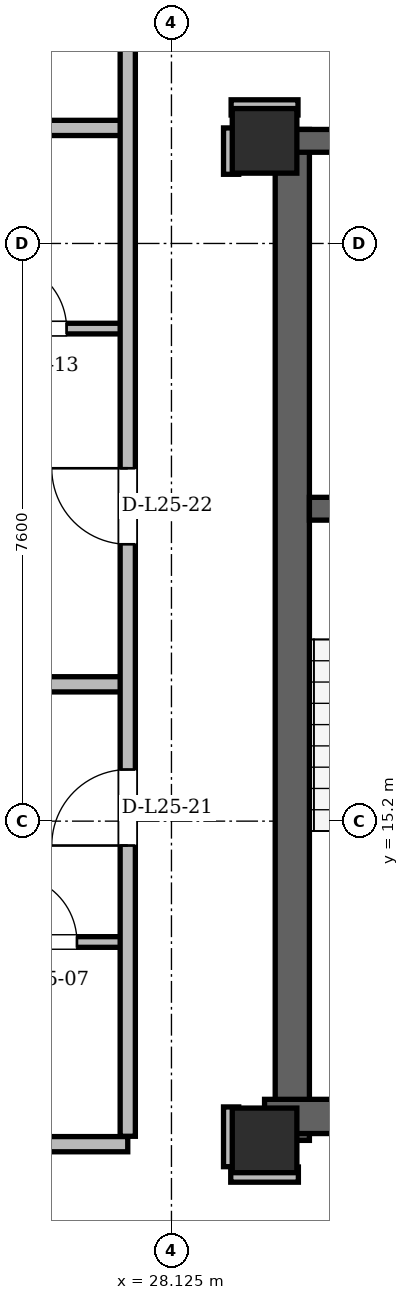
"""IFC4 building model, lengths in metres.
Left out: names, types, materials, properties, quantities, classifications, styles, units other than length and angle.
Written with IfcOpenShell. Run it as: python <this file> out.ifc"""

import sys

from ifc_helpers import new_model, si_unit, direction, frame, frame_2d, origin, origin_2d, place, context, subcontext, project, spatial, rectangle, hollow_rectangle, extrude, element, fill, save


model = new_model("IFC4")
c1 = context("Model", 3, precision=1e-05, world=origin(), true_north=direction((0.0, 1.0)))
c2 = subcontext(c1, "Body", "Model", "MODEL_VIEW")
j1 = project(units=[si_unit("LENGTHUNIT", "METRE"), si_unit("PLANEANGLEUNIT", "RADIAN")], contexts=[c1])
p1 = place(None, origin())
s1 = spatial("IfcSite", under=j1, at=p1, CompositionType="ELEMENT")
p2 = place(p1, origin())
s2 = spatial("IfcBuilding", under=s1, at=p2, CompositionType="ELEMENT")
p3 = place(p2, frame((0.0, 0.0, 96.9)))
s3 = spatial("IfcBuildingStorey", under=s2, at=p3, CompositionType="ELEMENT", Elevation=96.9)
for number, where, z_axis, x_axis in (
    (1, (29.35, 11.0, 0.0), (0.0, 0.0, 1.0), (1.0, 0.0, 0.0)),
    (2, (29.35, 24.15, 0.0), (0.0, 0.0, 1.0), (1.0, 0.0, 0.0)),
):
    element("IfcColumn", number, at=place(p3, frame(where, z_axis=z_axis, x_axis=x_axis)), inside=s3, PredefinedType="COLUMN", context=c2, shape_type="SweptSolid", body=[
        extrude(hollow_rectangle(XDim=0.85, YDim=0.85, WallThickness=0.07, at=origin_2d()), origin(), (0.0, 0.0, 1.0), 3.6),
    ])
p4 = place(p3, frame((29.715, 11.0, 0.0), z_axis=(0.0, 0.0, 1.0), x_axis=(0.0, 1.0, 0.0)))
e3 = element("IfcWall", 3, at=p4, inside=s3, PredefinedType="SHEAR", context=c2, shape_type="SweptSolid", body=[
    extrude(rectangle(XDim=13.3, YDim=0.45, at=frame_2d((6.65, 0.0))), origin(), (0.0, 0.0, 1.0), 3.36),
])
p5 = place(p3, frame((29.35, 11.315, 0.0), z_axis=(0.0, 0.0, 1.0), x_axis=(1.0, 0.0, 0.0)))
e4 = element("IfcWall", 4, at=p5, inside=s3, PredefinedType="SHEAR", context=c2, shape_type="SweptSolid", body=[
    extrude(rectangle(XDim=7.1, YDim=0.45, at=frame_2d((3.55, 0.0))), origin(), (0.0, 0.0, 1.0), 3.36),
])
p6 = place(p3, frame((29.65, 24.15, 0.0), z_axis=(0.0, 0.0, 1.0), x_axis=(1.0, 0.0, 0.0)))
e5 = element("IfcWall", 5, at=p6, inside=s3, PredefinedType="SHEAR", context=c2, shape_type="SweptSolid", body=[
    extrude(rectangle(XDim=15.7, YDim=0.3, at=frame_2d((7.85, 0.0))), origin(), (0.0, 0.0, 1.0), 3.36),
])
p7 = place(p6, frame((1.7, 0.0, 0.0)))
e6 = element("IfcOpeningElement", 6, at=p7, cuts=e5, PredefinedType="OPENING", context=c2, shape_type="SweptSolid", body=[
    extrude(rectangle(XDim=1.2, YDim=2.2, at=frame_2d((0.6, 1.1))), frame((0.0, 0.15, 0.0), z_axis=(0.0, -1.0, 0.0), x_axis=(1.0, 0.0, 0.0)), (0.0, 0.0, 1.0), 0.3),
])
p8 = place(p6, frame((12.8, 0.0, 0.0)))
e7 = element("IfcOpeningElement", 7, at=p8, cuts=e5, PredefinedType="OPENING", context=c2, shape_type="SweptSolid", body=[
    extrude(rectangle(XDim=1.2, YDim=2.2, at=frame_2d((0.6, 1.1))), frame((0.0, 0.15, 0.0), z_axis=(0.0, -1.0, 0.0), x_axis=(1.0, 0.0, 0.0)), (0.0, 0.0, 1.0), 0.3),
])
p9 = place(p6, frame((6.55, 0.0, 0.0)))
e8 = element("IfcOpeningElement", 8, at=p9, cuts=e5, PredefinedType="OPENING", context=c2, shape_type="SweptSolid", body=[
    extrude(rectangle(XDim=0.9, YDim=2.05, at=frame_2d((0.45, 1.025))), frame((0.0, 0.15, 0.0), z_axis=(0.0, -1.0, 0.0), x_axis=(1.0, 0.0, 0.0)), (0.0, 0.0, 1.0), 0.3),
])
p10 = place(p6, frame((8.45, 0.0, 0.0)))
e9 = element("IfcOpeningElement", 9, at=p10, cuts=e5, PredefinedType="OPENING", context=c2, shape_type="SweptSolid", body=[
    extrude(rectangle(XDim=0.9, YDim=2.05, at=frame_2d((0.45, 1.025))), frame((0.0, 0.15, 0.0), z_axis=(0.0, -1.0, 0.0), x_axis=(1.0, 0.0, 0.0)), (0.0, 0.0, 1.0), 0.3),
])
p11 = place(p3, frame((29.94, 19.31, 0.0), z_axis=(0.0, 0.0, 1.0), x_axis=(1.0, 0.0, 0.0)))
e10 = element("IfcWall", 10, at=p11, inside=s3, PredefinedType="SHEAR", context=c2, shape_type="SweptSolid", body=[
    extrude(rectangle(XDim=4.01, YDim=0.3, at=frame_2d((2.005, 0.0))), origin(), (0.0, 0.0, 1.0), 3.36),
])
p12 = place(p11, frame((1.01, 0.0, 0.0)))
e11 = element("IfcOpeningElement", 11, at=p12, cuts=e10, PredefinedType="OPENING", context=c2, shape_type="SweptSolid", body=[
    extrude(rectangle(XDim=1.4, YDim=2.2, at=frame_2d((0.7, 1.1))), frame((0.0, 0.15, 0.0), z_axis=(0.0, -1.0, 0.0), x_axis=(1.0, 0.0, 0.0)), (0.0, 0.0, 1.0), 0.3),
])
p13 = place(p3, frame((31.472, 43.462, 0.0), z_axis=(0.0, 0.0, 1.0), x_axis=(-0.499995749028, -0.86602785807, 0.0)))
e12 = element("IfcWall", 12, at=p13, inside=s3, PredefinedType="SOLIDWALL", context=c2, shape_type="SweptSolid", body=[
    extrude(rectangle(XDim=34.437, YDim=0.34, at=frame_2d((17.218, 0.0))), origin(), (0.0, 0.0, 1.0), 2.578),
])
p14 = place(p13, frame((6.469, 0.0, 0.0)))
e13 = element("IfcOpeningElement", 13, at=p14, cuts=e12, PredefinedType="OPENING", context=c2, shape_type="SweptSolid", body=[
    extrude(rectangle(XDim=1.3, YDim=2.2, at=frame_2d((0.65, 1.1))), frame((0.0, 0.17, 0.0), z_axis=(0.0, -1.0, 0.0), x_axis=(1.0, 0.0, 0.0)), (0.0, 0.0, 1.0), 0.34),
])
p15 = place(p13, frame((24.902, 0.0, 0.0)))
e14 = element("IfcOpeningElement", 14, at=p15, cuts=e12, PredefinedType="OPENING", context=c2, shape_type="SweptSolid", body=[
    extrude(rectangle(XDim=1.5, YDim=2.2, at=frame_2d((0.75, 1.1))), frame((0.0, 0.17, 0.0), z_axis=(0.0, -1.0, 0.0), x_axis=(1.0, 0.0, 0.0)), (0.0, 0.0, 1.0), 0.34),
])
p16 = place(p13, frame((30.75, 0.0, 0.85)))
e15 = element("IfcOpeningElement", 15, at=p16, cuts=e12, PredefinedType="OPENING", context=c2, shape_type="SweptSolid", body=[
    extrude(rectangle(XDim=1.4, YDim=1.6, at=frame_2d((0.7, 0.8))), frame((0.0, 0.17, 0.0), z_axis=(0.0, -1.0, 0.0), x_axis=(1.0, 0.0, 0.0)), (0.0, 0.0, 1.0), 0.34),
])
p17 = place(p13, frame((11.337, 0.0, 0.85)))
e16 = element("IfcOpeningElement", 16, at=p17, cuts=e12, PredefinedType="OPENING", context=c2, shape_type="SweptSolid", body=[
    extrude(rectangle(XDim=2.8, YDim=1.618, at=frame_2d((1.4, 0.809))), frame((0.0, 0.17, 0.0), z_axis=(0.0, -1.0, 0.0), x_axis=(1.0, 0.0, 0.0)), (0.0, 0.0, 1.0), 0.34),
])
p18 = place(p13, frame((18.111, 0.0, 0.85)))
e17 = element("IfcOpeningElement", 17, at=p18, cuts=e12, PredefinedType="OPENING", context=c2, shape_type="SweptSolid", body=[
    extrude(rectangle(XDim=2.2, YDim=1.618, at=frame_2d((1.1, 0.809))), frame((0.0, 0.17, 0.0), z_axis=(0.0, -1.0, 0.0), x_axis=(1.0, 0.0, 0.0)), (0.0, 0.0, 1.0), 0.34),
])
p19 = place(p13, frame((3.044, 0.0, 0.85)))
e18 = element("IfcOpeningElement", 18, at=p19, cuts=e12, PredefinedType="OPENING", context=c2, shape_type="SweptSolid", body=[
    extrude(rectangle(XDim=1.2, YDim=1.48, at=frame_2d((0.6, 0.74))), frame((0.0, 0.17, 0.0), z_axis=(0.0, -1.0, 0.0), x_axis=(1.0, 0.0, 0.0)), (0.0, 0.0, 1.0), 0.34),
])
p20 = place(p3, frame((28.905, 10.55, 0.0), z_axis=(0.0, 0.0, 1.0), x_axis=(1.0, 0.0, 0.0)))
e19 = element("IfcWall", 19, at=p20, inside=s3, PredefinedType="PARTITIONING", context=c2, shape_type="SweptSolid", body=[
    extrude(rectangle(XDim=0.89, YDim=0.2, at=frame_2d((0.445, 0.0))), origin(), (0.0, 0.0, 1.0), 3.36),
])
p21 = place(p3, frame((16.007, 10.95, 0.0), z_axis=(0.0, 0.0, 1.0), x_axis=(1.0, 0.0, 0.0)))
e20 = element("IfcWall", 20, at=p21, inside=s3, PredefinedType="PARTITIONING", context=c2, shape_type="SweptSolid", body=[
    extrude(rectangle(XDim=11.543, YDim=0.2, at=frame_2d((5.771, 0.0))), origin(), (0.0, 0.0, 1.0), 3.36),
])
p22 = place(p3, frame((14.647, 13.61, 0.0), z_axis=(0.0, 0.0, 1.0), x_axis=(1.0, 0.0, 0.0)))
e21 = element("IfcWall", 21, at=p22, inside=s3, PredefinedType="PARTITIONING", context=c2, shape_type="SweptSolid", body=[
    extrude(rectangle(XDim=12.953, YDim=0.14, at=frame_2d((6.477, 0.0))), origin(), (0.0, 0.0, 1.0), 2.814),
])
p23 = place(p22, frame((3.226, 0.0, 0.0)))
e22 = element("IfcOpeningElement", 22, at=p23, cuts=e21, PredefinedType="OPENING", context=c2, shape_type="SweptSolid", body=[
    extrude(rectangle(XDim=0.92, YDim=2.12, at=frame_2d((0.46, 1.06))), frame((0.0, 0.07, 0.0), z_axis=(0.0, -1.0, 0.0), x_axis=(1.0, 0.0, 0.0)), (0.0, 0.0, 1.0), 0.14),
])
p24 = place(p22, frame((8.656, 0.0, 0.0)))
e23 = element("IfcOpeningElement", 23, at=p24, cuts=e21, PredefinedType="OPENING", context=c2, shape_type="SweptSolid", body=[
    extrude(rectangle(XDim=0.95, YDim=2.1, at=frame_2d((0.475, 1.05))), frame((0.0, 0.07, 0.0), z_axis=(0.0, -1.0, 0.0), x_axis=(1.0, 0.0, 0.0)), (0.0, 0.0, 1.0), 0.14),
])
p25 = place(p22, frame((11.355, 0.0, 0.0)))
e24 = element("IfcOpeningElement", 24, at=p25, cuts=e21, PredefinedType="OPENING", context=c2, shape_type="SweptSolid", body=[
    extrude(rectangle(XDim=0.88, YDim=2.08, at=frame_2d((0.44, 1.04))), frame((0.0, 0.07, 0.0), z_axis=(0.0, -1.0, 0.0), x_axis=(1.0, 0.0, 0.0)), (0.0, 0.0, 1.0), 0.14),
])
p26 = place(p3, frame((16.395, 17.0, 0.0), z_axis=(0.0, 0.0, 1.0), x_axis=(1.0, 0.0, 0.0)))
e25 = element("IfcWall", 25, at=p26, inside=s3, PredefinedType="PARTITIONING", context=c2, shape_type="SweptSolid", body=[
    extrude(rectangle(XDim=11.155, YDim=0.2, at=frame_2d((5.578, 0.0))), origin(), (0.0, 0.0, 1.0), 3.36),
])
p27 = place(p3, frame((19.097, 21.68, 0.0), z_axis=(0.0, 0.0, 1.0), x_axis=(1.0, 0.0, 0.0)))
e26 = element("IfcWall", 26, at=p27, inside=s3, PredefinedType="PARTITIONING", context=c2, shape_type="SweptSolid", body=[
    extrude(rectangle(XDim=8.503, YDim=0.14, at=frame_2d((4.251, 0.0))), origin(), (0.0, 0.0, 1.0), 3.36),
])
p28 = place(p27, frame((1.364, 0.0, 0.0)))
e27 = element("IfcOpeningElement", 27, at=p28, cuts=e26, PredefinedType="OPENING", context=c2, shape_type="SweptSolid", body=[
    extrude(rectangle(XDim=0.95, YDim=2.1, at=frame_2d((0.475, 1.05))), frame((0.0, 0.07, 0.0), z_axis=(0.0, -1.0, 0.0), x_axis=(1.0, 0.0, 0.0)), (0.0, 0.0, 1.0), 0.14),
])
p29 = place(p27, frame((3.933, 0.0, 0.0)))
e28 = element("IfcOpeningElement", 28, at=p29, cuts=e26, PredefinedType="OPENING", context=c2, shape_type="SweptSolid", body=[
    extrude(rectangle(XDim=0.95, YDim=2.1, at=frame_2d((0.475, 1.05))), frame((0.0, 0.07, 0.0), z_axis=(0.0, -1.0, 0.0), x_axis=(1.0, 0.0, 0.0)), (0.0, 0.0, 1.0), 0.14),
])
p30 = place(p27, frame((6.768, 0.0, 0.0)))
e29 = element("IfcOpeningElement", 29, at=p30, cuts=e26, PredefinedType="OPENING", context=c2, shape_type="SweptSolid", body=[
    extrude(rectangle(XDim=0.88, YDim=2.08, at=frame_2d((0.44, 1.04))), frame((0.0, 0.07, 0.0), z_axis=(0.0, -1.0, 0.0), x_axis=(1.0, 0.0, 0.0)), (0.0, 0.0, 1.0), 0.14),
])
p31 = place(p3, frame((20.621, 24.32, 0.0), z_axis=(0.0, 0.0, 1.0), x_axis=(1.0, 0.0, 0.0)))
e30 = element("IfcWall", 30, at=p31, inside=s3, PredefinedType="PARTITIONING", context=c2, shape_type="SweptSolid", body=[
    extrude(rectangle(XDim=6.929, YDim=0.2, at=frame_2d((3.464, 0.0))), origin(), (0.0, 0.0, 1.0), 3.36),
])
p32 = place(p3, frame((28.91, 24.59, 0.0), z_axis=(0.0, 0.0, 1.0), x_axis=(1.0, 0.0, 0.0)))
e31 = element("IfcWall", 31, at=p32, inside=s3, PredefinedType="PARTITIONING", context=c2, shape_type="SweptSolid", body=[
    extrude(rectangle(XDim=0.88, YDim=0.2, at=frame_2d((0.44, 0.0))), origin(), (0.0, 0.0, 1.0), 2.814),
])
p33 = place(p3, frame((27.55, 11.054, 0.0), z_axis=(0.0, 0.0, 1.0), x_axis=(0.0, 1.0, 0.0)))
e32 = element("IfcWall", 32, at=p33, inside=s3, PredefinedType="PARTITIONING", context=c2, shape_type="SweptSolid", body=[
    extrude(rectangle(XDim=14.812, YDim=0.2, at=frame_2d((7.406, 0.0))), origin(), (0.0, 0.0, 1.0), 2.814),
])
p34 = place(p33, frame((3.825, 0.0, 0.0)))
e33 = element("IfcOpeningElement", 33, at=p34, cuts=e32, PredefinedType="OPENING", context=c2, shape_type="SweptSolid", body=[
    extrude(rectangle(XDim=1.0, YDim=2.18, at=frame_2d((0.5, 1.09))), frame((0.0, 0.1, 0.0), z_axis=(0.0, -1.0, 0.0), x_axis=(1.0, 0.0, 0.0)), (0.0, 0.0, 1.0), 0.2),
])
p35 = place(p33, frame((7.788, 0.0, 0.0)))
e34 = element("IfcOpeningElement", 34, at=p35, cuts=e32, PredefinedType="OPENING", context=c2, shape_type="SweptSolid", body=[
    extrude(rectangle(XDim=1.0, YDim=2.18, at=frame_2d((0.5, 1.09))), frame((0.0, 0.1, 0.0), z_axis=(0.0, -1.0, 0.0), x_axis=(1.0, 0.0, 0.0)), (0.0, 0.0, 1.0), 0.2),
])
p36 = place(p3, frame((28.91, 10.654, 0.0), z_axis=(0.0, 0.0, 1.0), x_axis=(0.0, 1.0, 0.0)))
e35 = element("IfcWall", 35, at=p36, inside=s3, PredefinedType="PARTITIONING", context=c2, shape_type="SweptSolid", body=[
    extrude(rectangle(XDim=0.786, YDim=0.2, at=frame_2d((0.393, 0.0))), origin(), (0.0, 0.0, 1.0), 2.814),
])
p37 = place(p3, frame((28.91, 23.71, 0.0), z_axis=(0.0, 0.0, 1.0), x_axis=(0.0, 1.0, 0.0)))
e36 = element("IfcWall", 36, at=p37, inside=s3, PredefinedType="PARTITIONING", context=c2, shape_type="SweptSolid", body=[
    extrude(rectangle(XDim=0.61, YDim=0.2, at=frame_2d((0.305, 0.0))), origin(), (0.0, 0.0, 1.0), 3.36),
])
p38 = place(p25, origin())
e37 = element("IfcDoor", 37, at=p38, inside=s3, OperationType="SINGLE_SWING_LEFT", PredefinedType="DOOR", context=c2, shape_type="SweptSolid", body=[
    extrude(rectangle(XDim=0.88, YDim=2.08, at=frame_2d((0.44, 1.04))), frame((0.0, 0.025, 0.0), z_axis=(0.0, -1.0, 0.0), x_axis=(1.0, 0.0, 0.0)), (0.0, 0.0, 1.0), 0.05),
])
fill(e24, e37)
p39 = place(p30, origin())
e38 = element("IfcDoor", 38, at=p39, inside=s3, OperationType="SINGLE_SWING_LEFT", PredefinedType="DOOR", context=c2, shape_type="SweptSolid", body=[
    extrude(rectangle(XDim=0.88, YDim=2.08, at=frame_2d((0.44, 1.04))), frame((0.0, 0.025, 0.0), z_axis=(0.0, -1.0, 0.0), x_axis=(1.0, 0.0, 0.0)), (0.0, 0.0, 1.0), 0.05),
])
fill(e29, e38)
p40 = place(p34, origin())
e39 = element("IfcDoor", 39, at=p40, inside=s3, OperationType="SINGLE_SWING_LEFT", PredefinedType="DOOR", context=c2, shape_type="SweptSolid", body=[
    extrude(rectangle(XDim=1.0, YDim=2.18, at=frame_2d((0.5, 1.09))), frame((0.0, 0.025, 0.0), z_axis=(0.0, -1.0, 0.0), x_axis=(1.0, 0.0, 0.0)), (0.0, 0.0, 1.0), 0.05),
])
fill(e33, e39)
p41 = place(p35, origin())
e40 = element("IfcDoor", 40, at=p41, inside=s3, OperationType="SINGLE_SWING_RIGHT", PredefinedType="DOOR", context=c2, shape_type="SweptSolid", body=[
    extrude(rectangle(XDim=1.0, YDim=2.18, at=frame_2d((0.5, 1.09))), frame((0.0, 0.025, 0.0), z_axis=(0.0, -1.0, 0.0), x_axis=(1.0, 0.0, 0.0)), (0.0, 0.0, 1.0), 0.05),
])
fill(e34, e40)
save(model, sys.argv[1])
